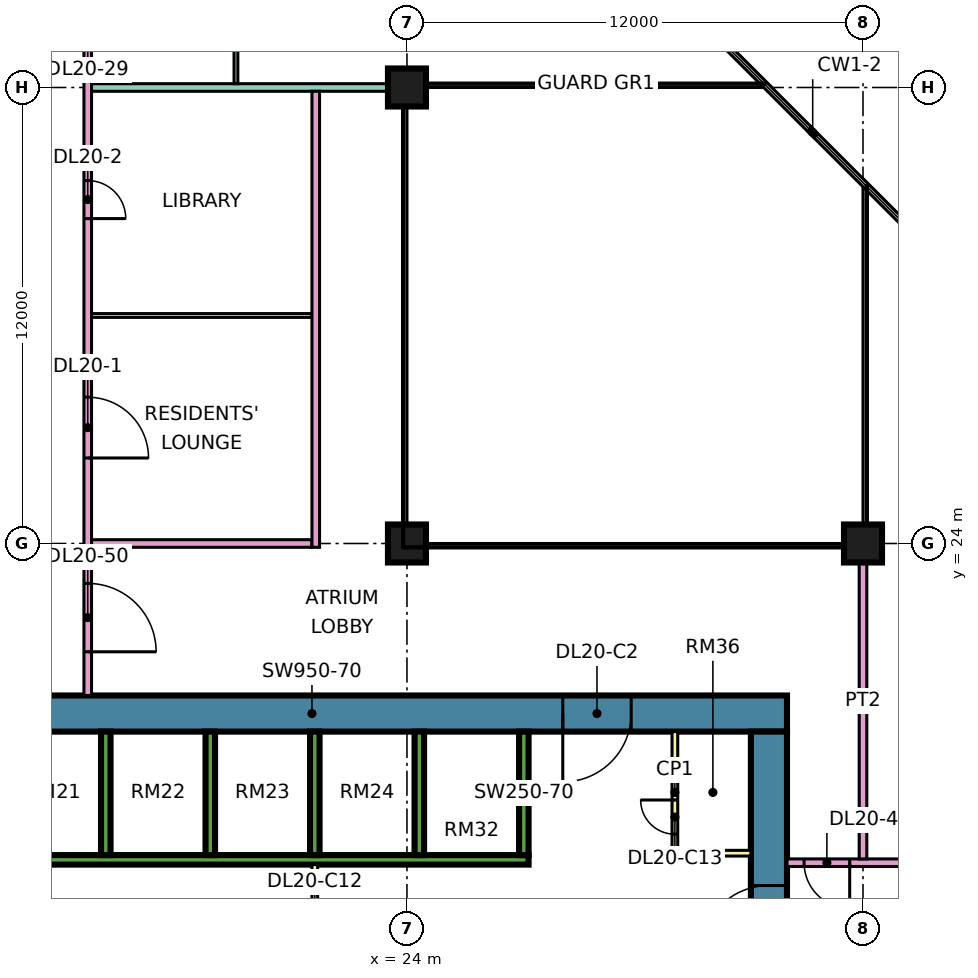
"""IFC4 building model, lengths in metres.
Left out: names, types, materials, properties, quantities, classifications, styles, units other than length and angle.
Written with IfcOpenShell. Run it as: python <this file> out.ifc"""

import sys

from ifc_helpers import new_model, si_unit, direction, frame, frame_2d, origin, origin_2d, place, context, subcontext, project, spatial, rectangle, extrude, element, fill, save


model = new_model("IFC4")
c1 = context("Model", 3, precision=1e-05, world=origin(), true_north=direction((0.0, 1.0)))
c2 = subcontext(c1, "Body", "Model", "MODEL_VIEW")
j1 = project(units=[si_unit("LENGTHUNIT", "METRE"), si_unit("PLANEANGLEUNIT", "RADIAN")], contexts=[c1])
p1 = place(None, origin())
s1 = spatial("IfcSite", under=j1, at=p1, CompositionType="ELEMENT")
p2 = place(p1, origin())
s2 = spatial("IfcBuilding", under=s1, at=p2, CompositionType="ELEMENT")
p3 = place(p2, frame((0.0, 0.0, 91.9)))
s3 = spatial("IfcBuildingStorey", under=s2, at=p3, CompositionType="ELEMENT", Elevation=91.9)
for number, where, z_axis, x_axis in (
    (1, (24.0, 24.0, 0.0), (0.0, 0.0, 1.0), (1.0, 0.0, 0.0)),
    (2, (24.0, 36.0, 0.0), (0.0, 0.0, 1.0), (1.0, 0.0, 0.0)),
    (3, (36.0, 24.0, 0.0), (0.0, 0.0, 1.0), (1.0, 0.0, 0.0)),
):
    element("IfcColumn", number, at=place(p3, frame(where, z_axis=z_axis, x_axis=x_axis)), inside=s3, PredefinedType="COLUMN", context=c2, shape_type="SweptSolid", body=[
        extrude(rectangle(XDim=1.0, YDim=1.0, at=origin_2d()), origin(), (0.0, 0.0, 1.0), 3.75),
    ])
p4 = place(p3, frame((9.0, 19.525, 0.0), z_axis=(0.0, 0.0, 1.0), x_axis=(1.0, 0.0, 0.0)))
e4 = element("IfcWall", 4, at=p4, inside=s3, PredefinedType="SHEAR", context=c2, shape_type="SweptSolid", body=[
    extrude(rectangle(XDim=25.0, YDim=0.95, at=frame_2d((12.5, 0.0))), origin(), (0.0, 0.0, 1.0), 3.75),
])
p5 = place(p4, frame((19.1, 0.0, 0.0)))
e5 = element("IfcOpeningElement", 5, at=p5, cuts=e4, PredefinedType="OPENING", context=c2, shape_type="SweptSolid", body=[
    extrude(rectangle(XDim=1.8, YDim=2.4, at=frame_2d((0.9, 1.2))), frame((0.0, 0.485, 0.0), z_axis=(0.0, -1.0, 0.0), x_axis=(1.0, 0.0, 0.0)), (0.0, 0.0, 1.0), 0.97),
])
p6 = place(p3, frame((33.525, 7.95, 0.0), z_axis=(0.0, 0.0, 1.0), x_axis=(0.0, 1.0, 0.0)))
e6 = element("IfcWall", 6, at=p6, inside=s3, PredefinedType="SHEAR", context=c2, shape_type="SweptSolid", body=[
    extrude(rectangle(XDim=11.1, YDim=0.95, at=frame_2d((5.55, 0.0))), origin(), (0.0, 0.0, 1.0), 3.75),
])
p7 = place(p6, frame((5.25, 0.0, 0.0)))
e7 = element("IfcOpeningElement", 7, at=p7, cuts=e6, PredefinedType="OPENING", context=c2, shape_type="SweptSolid", body=[
    extrude(rectangle(XDim=1.8, YDim=2.4, at=frame_2d((0.9, 1.2))), frame((0.0, 0.485, 0.0), z_axis=(0.0, -1.0, 0.0), x_axis=(1.0, 0.0, 0.0)), (0.0, 0.0, 1.0), 0.97),
])
p8 = place(p3, frame((13.45, 15.675, 0.0), z_axis=(0.0, 0.0, 1.0), x_axis=(1.0, 0.0, 0.0)))
e8 = element("IfcWall", 8, at=p8, inside=s3, PredefinedType="SHEAR", context=c2, shape_type="SweptSolid", body=[
    extrude(rectangle(XDim=13.75, YDim=0.25, at=frame_2d((6.875, 0.0))), origin(), (0.0, 0.0, 1.0), 3.75),
])
for number, where, z_axis, x_axis in (
    (9, (16.075, 15.8, 0.0), (0.0, 0.0, 1.0), (0.0, 1.0, 0.0)),
    (10, (18.825, 15.8, 0.0), (0.0, 0.0, 1.0), (0.0, 1.0, 0.0)),
    (11, (21.575, 15.8, 0.0), (0.0, 0.0, 1.0), (0.0, 1.0, 0.0)),
    (12, (24.325, 15.8, 0.0), (0.0, 0.0, 1.0), (0.0, 1.0, 0.0)),
    (13, (27.075, 15.8, 0.0), (0.0, 0.0, 1.0), (0.0, 1.0, 0.0)),
):
    element("IfcWall", number, at=place(p3, frame(where, z_axis=z_axis, x_axis=x_axis)), inside=s3, PredefinedType="SHEAR", context=c2, shape_type="SweptSolid", body=[
        extrude(rectangle(XDim=3.25, YDim=0.25, at=frame_2d((1.625, 0.0))), origin(), (0.0, 0.0, 1.0), 3.75),
    ])
p9 = place(p3, frame((21.575, 11.45, 0.0), z_axis=(0.0, 0.0, 1.0), x_axis=(0.0, 1.0, 0.0)))
e14 = element("IfcWall", 14, at=p9, inside=s3, PredefinedType="PARTITIONING", context=c2, shape_type="SweptSolid", body=[
    extrude(rectangle(XDim=4.1, YDim=0.15, at=frame_2d((2.05, 0.0))), origin(), (0.0, 0.0, 1.0), 3.35),
])
p10 = place(p9, frame((1.15, 0.0, 0.0)))
e15 = element("IfcOpeningElement", 15, at=p10, cuts=e14, PredefinedType="OPENING", context=c2, shape_type="SweptSolid", body=[
    extrude(rectangle(XDim=1.8, YDim=2.4, at=frame_2d((0.9, 1.2))), frame((0.0, 0.085, 0.0), z_axis=(0.0, -1.0, 0.0), x_axis=(1.0, 0.0, 0.0)), (0.0, 0.0, 1.0), 0.17),
])
p11 = place(p3, frame((31.05, 15.85, 0.0), z_axis=(0.0, 0.0, 1.0), x_axis=(0.0, 1.0, 0.0)))
e16 = element("IfcWall", 16, at=p11, inside=s3, PredefinedType="PARTITIONING", context=c2, shape_type="SweptSolid", body=[
    extrude(rectangle(XDim=3.2, YDim=0.15, at=frame_2d((1.6, 0.0))), origin(), (0.0, 0.0, 1.0), 3.35),
])
p12 = place(p11, frame((0.5, 0.0, 0.0)))
e17 = element("IfcOpeningElement", 17, at=p12, cuts=e16, PredefinedType="OPENING", context=c2, shape_type="SweptSolid", body=[
    extrude(rectangle(XDim=0.9, YDim=2.1, at=frame_2d((0.45, 1.05))), frame((0.0, 0.085, 0.0), z_axis=(0.0, -1.0, 0.0), x_axis=(1.0, 0.0, 0.0)), (0.0, 0.0, 1.0), 0.17),
])
p13 = place(p3, frame((31.05, 15.85, 0.0), z_axis=(0.0, 0.0, 1.0), x_axis=(1.0, 0.0, 0.0)))
e18 = element("IfcWall", 18, at=p13, inside=s3, PredefinedType="PARTITIONING", context=c2, shape_type="SweptSolid", body=[
    extrude(rectangle(XDim=2.0, YDim=0.15, at=frame_2d((1.0, 0.0))), origin(), (0.0, 0.0, 1.0), 3.35),
])
p14 = place(p3, frame((15.6, 20.0, 0.0), z_axis=(0.0, 0.0, 1.0), x_axis=(0.0, 1.0, 0.0)))
e19 = element("IfcWall", 19, at=p14, inside=s3, PredefinedType="PARTITIONING", context=c2, shape_type="SweptSolid", body=[
    extrude(rectangle(XDim=27.775, YDim=0.2, at=frame_2d((13.887, 0.0))), origin(), (0.0, 0.0, 1.0), 3.35),
])
p15 = place(p14, frame((6.25, 0.0, 0.0)))
e20 = element("IfcOpeningElement", 20, at=p15, cuts=e19, PredefinedType="OPENING", context=c2, shape_type="SweptSolid", body=[
    extrude(rectangle(XDim=1.6, YDim=2.1, at=frame_2d((0.8, 1.05))), frame((0.0, 0.11, 0.0), z_axis=(0.0, -1.0, 0.0), x_axis=(1.0, 0.0, 0.0)), (0.0, 0.0, 1.0), 0.22),
])
p16 = place(p14, frame((12.55, 0.0, 0.0)))
e21 = element("IfcOpeningElement", 21, at=p16, cuts=e19, PredefinedType="OPENING", context=c2, shape_type="SweptSolid", body=[
    extrude(rectangle(XDim=1.0, YDim=2.1, at=frame_2d((0.5, 1.05))), frame((0.0, 0.11, 0.0), z_axis=(0.0, -1.0, 0.0), x_axis=(1.0, 0.0, 0.0)), (0.0, 0.0, 1.0), 0.22),
])
p17 = place(p14, frame((17.05, 0.0, 0.0)))
e22 = element("IfcOpeningElement", 22, at=p17, cuts=e19, PredefinedType="OPENING", context=c2, shape_type="SweptSolid", body=[
    extrude(rectangle(XDim=1.0, YDim=2.1, at=frame_2d((0.5, 1.05))), frame((0.0, 0.11, 0.0), z_axis=(0.0, -1.0, 0.0), x_axis=(1.0, 0.0, 0.0)), (0.0, 0.0, 1.0), 0.22),
])
p18 = place(p14, frame((1.15, 0.0, 0.0)))
e23 = element("IfcOpeningElement", 23, at=p18, cuts=e19, PredefinedType="OPENING", context=c2, shape_type="SweptSolid", body=[
    extrude(rectangle(XDim=1.8, YDim=2.1, at=frame_2d((0.9, 1.05))), frame((0.0, 0.11, 0.0), z_axis=(0.0, -1.0, 0.0), x_axis=(1.0, 0.0, 0.0)), (0.0, 0.0, 1.0), 0.22),
])
p19 = place(p14, frame((25.9, 0.0, 0.0)))
e24 = element("IfcOpeningElement", 24, at=p19, cuts=e19, PredefinedType="OPENING", context=c2, shape_type="SweptSolid", body=[
    extrude(rectangle(XDim=1.0, YDim=2.1, at=frame_2d((0.5, 1.05))), frame((0.0, 0.11, 0.0), z_axis=(0.0, -1.0, 0.0), x_axis=(1.0, 0.0, 0.0)), (0.0, 0.0, 1.0), 0.22),
])
p20 = place(p3, frame((15.7, 24.0, 0.0), z_axis=(0.0, 0.0, 1.0), x_axis=(1.0, 0.0, 0.0)))
e25 = element("IfcWall", 25, at=p20, inside=s3, PredefinedType="PARTITIONING", context=c2, shape_type="SweptSolid", body=[
    extrude(rectangle(XDim=5.8, YDim=0.2, at=frame_2d((2.9, 0.0))), origin(), (0.0, 0.0, 1.0), 3.35),
])
p21 = place(p3, frame((15.7, 30.0, 0.0), z_axis=(0.0, 0.0, 1.0), x_axis=(1.0, 0.0, 0.0)))
e26 = element("IfcWall", 26, at=p21, inside=s3, PredefinedType="PARTITIONING", context=c2, shape_type="SweptSolid", body=[
    extrude(rectangle(XDim=5.8, YDim=0.1, at=frame_2d((2.9, 0.0))), origin(), (0.0, 0.0, 1.0), 3.35),
])
p22 = place(p3, frame((15.7, 36.0, 0.0), z_axis=(0.0, 0.0, 1.0), x_axis=(1.0, 0.0, 0.0)))
e27 = element("IfcWall", 27, at=p22, inside=s3, PredefinedType="PARTITIONING", context=c2, shape_type="SweptSolid", body=[
    extrude(rectangle(XDim=8.3, YDim=0.2, at=frame_2d((4.15, 0.0))), origin(), (0.0, 0.0, 1.0), 3.35),
])
p23 = place(p3, frame((19.5, 36.1, 0.0), z_axis=(0.0, 0.0, 1.0), x_axis=(0.0, 1.0, 0.0)))
e28 = element("IfcWall", 28, at=p23, inside=s3, PredefinedType="PARTITIONING", context=c2, shape_type="SweptSolid", body=[
    extrude(rectangle(XDim=2.85, YDim=0.1, at=frame_2d((1.425, 0.0))), origin(), (0.0, 0.0, 1.0), 3.35),
])
p24 = place(p23, frame((0.95, 0.0, 0.0)))
e29 = element("IfcOpeningElement", 29, at=p24, cuts=e28, PredefinedType="OPENING", context=c2, shape_type="SweptSolid", body=[
    extrude(rectangle(XDim=0.9, YDim=2.1, at=frame_2d((0.45, 1.05))), frame((0.0, 0.06, 0.0), z_axis=(0.0, -1.0, 0.0), x_axis=(1.0, 0.0, 0.0)), (0.0, 0.0, 1.0), 0.12),
])
p25 = place(p3, frame((21.6, 23.9, 0.0), z_axis=(0.0, 0.0, 1.0), x_axis=(0.0, 1.0, 0.0)))
e30 = element("IfcWall", 30, at=p25, inside=s3, PredefinedType="PARTITIONING", context=c2, shape_type="SweptSolid", body=[
    extrude(rectangle(XDim=12.0, YDim=0.2, at=frame_2d((6.0, 0.0))), origin(), (0.0, 0.0, 1.0), 3.35),
])
p26 = place(p3, frame((34.0, 15.6, 0.0), z_axis=(0.0, 0.0, 1.0), x_axis=(1.0, 0.0, 0.0)))
e31 = element("IfcWall", 31, at=p26, inside=s3, PredefinedType="PARTITIONING", context=c2, shape_type="SweptSolid", body=[
    extrude(rectangle(XDim=10.35, YDim=0.2, at=frame_2d((5.175, 0.0))), origin(), (0.0, 0.0, 1.0), 3.35),
])
p27 = place(p26, frame((5.6, 0.0, 0.0)))
e32 = element("IfcOpeningElement", 32, at=p27, cuts=e31, PredefinedType="OPENING", context=c2, shape_type="SweptSolid", body=[
    extrude(rectangle(XDim=1.0, YDim=2.1, at=frame_2d((0.5, 1.05))), frame((0.0, 0.11, 0.0), z_axis=(0.0, -1.0, 0.0), x_axis=(1.0, 0.0, 0.0)), (0.0, 0.0, 1.0), 0.22),
])
p28 = place(p26, frame((0.45, 0.0, 0.0)))
e33 = element("IfcOpeningElement", 33, at=p28, cuts=e31, PredefinedType="OPENING", context=c2, shape_type="SweptSolid", body=[
    extrude(rectangle(XDim=1.2, YDim=2.1, at=frame_2d((0.6, 1.05))), frame((0.0, 0.11, 0.0), z_axis=(0.0, -1.0, 0.0), x_axis=(1.0, 0.0, 0.0)), (0.0, 0.0, 1.0), 0.22),
])
p29 = place(p3, frame((36.0, 15.7, 0.0), z_axis=(0.0, 0.0, 1.0), x_axis=(0.0, 1.0, 0.0)))
e34 = element("IfcWall", 34, at=p29, inside=s3, PredefinedType="PARTITIONING", context=c2, shape_type="SweptSolid", body=[
    extrude(rectangle(XDim=8.3, YDim=0.2, at=frame_2d((4.15, 0.0))), origin(), (0.0, 0.0, 1.0), 3.35),
])
p30 = place(p7, origin())
e35 = element("IfcDoor", 35, at=p30, inside=s3, OperationType="DOUBLE_DOOR_SINGLE_SWING", PredefinedType="DOOR", context=c2, shape_type="SweptSolid", body=[
    extrude(rectangle(XDim=1.8, YDim=2.4, at=frame_2d((0.9, 1.2))), frame((0.0, 0.025, 0.0), z_axis=(0.0, -1.0, 0.0), x_axis=(1.0, 0.0, 0.0)), (0.0, 0.0, 1.0), 0.05),
])
fill(e7, e35)
p31 = place(p5, frame((1.8, 0.0, 0.0), z_axis=(0.0, 0.0, 1.0), x_axis=(-1.0, 0.0, 0.0)))
e36 = element("IfcDoor", 36, at=p31, inside=s3, OperationType="DOUBLE_DOOR_SINGLE_SWING", PredefinedType="DOOR", context=c2, shape_type="SweptSolid", body=[
    extrude(rectangle(XDim=1.8, YDim=2.4, at=frame_2d((0.9, 1.2))), frame((0.0, 0.025, 0.0), z_axis=(0.0, -1.0, 0.0), x_axis=(1.0, 0.0, 0.0)), (0.0, 0.0, 1.0), 0.05),
])
fill(e5, e36)
p32 = place(p12, frame((0.9, 0.0, 0.0), z_axis=(0.0, 0.0, 1.0), x_axis=(-1.0, 0.0, 0.0)))
e37 = element("IfcDoor", 37, at=p32, inside=s3, OperationType="SINGLE_SWING_RIGHT", PredefinedType="DOOR", context=c2, shape_type="SweptSolid", body=[
    extrude(rectangle(XDim=0.9, YDim=2.1, at=frame_2d((0.45, 1.05))), frame((0.0, 0.025, 0.0), z_axis=(0.0, -1.0, 0.0), x_axis=(1.0, 0.0, 0.0)), (0.0, 0.0, 1.0), 0.05),
])
fill(e17, e37)
p33 = place(p15, frame((1.6, 0.0, 0.0), z_axis=(0.0, 0.0, 1.0), x_axis=(-1.0, 0.0, 0.0)))
e38 = element("IfcDoor", 38, at=p33, inside=s3, OperationType="DOUBLE_DOOR_SINGLE_SWING", PredefinedType="DOOR", context=c2, shape_type="SweptSolid", body=[
    extrude(rectangle(XDim=1.6, YDim=2.1, at=frame_2d((0.8, 1.05))), frame((0.0, 0.025, 0.0), z_axis=(0.0, -1.0, 0.0), x_axis=(1.0, 0.0, 0.0)), (0.0, 0.0, 1.0), 0.05),
])
fill(e20, e38)
p34 = place(p16, frame((1.0, 0.0, 0.0), z_axis=(0.0, 0.0, 1.0), x_axis=(-1.0, 0.0, 0.0)))
e39 = element("IfcDoor", 39, at=p34, inside=s3, OperationType="SINGLE_SWING_LEFT", PredefinedType="DOOR", context=c2, shape_type="SweptSolid", body=[
    extrude(rectangle(XDim=1.0, YDim=2.1, at=frame_2d((0.5, 1.05))), frame((0.0, 0.025, 0.0), z_axis=(0.0, -1.0, 0.0), x_axis=(1.0, 0.0, 0.0)), (0.0, 0.0, 1.0), 0.05),
])
fill(e21, e39)
p35 = place(p28, origin())
e40 = element("IfcDoor", 40, at=p35, inside=s3, OperationType="SINGLE_SWING_RIGHT", PredefinedType="DOOR", context=c2, shape_type="SweptSolid", body=[
    extrude(rectangle(XDim=1.2, YDim=2.1, at=frame_2d((0.6, 1.05))), frame((0.0, 0.025, 0.0), z_axis=(0.0, -1.0, 0.0), x_axis=(1.0, 0.0, 0.0)), (0.0, 0.0, 1.0), 0.05),
])
fill(e33, e40)
p36 = place(p18, frame((1.8, 0.0, 0.0), z_axis=(0.0, 0.0, 1.0), x_axis=(-1.0, 0.0, 0.0)))
e41 = element("IfcDoor", 41, at=p36, inside=s3, OperationType="DOUBLE_DOOR_SINGLE_SWING", PredefinedType="DOOR", context=c2, shape_type="SweptSolid", body=[
    extrude(rectangle(XDim=1.8, YDim=2.1, at=frame_2d((0.9, 1.05))), frame((0.0, 0.025, 0.0), z_axis=(0.0, -1.0, 0.0), x_axis=(1.0, 0.0, 0.0)), (0.0, 0.0, 1.0), 0.05),
])
fill(e23, e41)
save(model, sys.argv[1])
